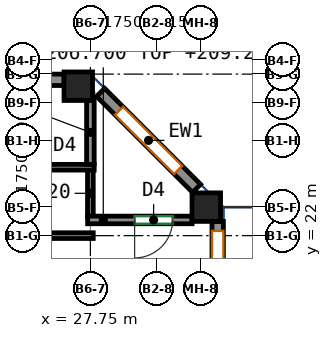
"""IFC4 building model, lengths in metres.
Left out: names, types, materials, properties, quantities, classifications, styles, units other than length and angle.
Written with IfcOpenShell. Run it as: python <this file> out.ifc"""

import sys

from ifc_helpers import new_model, si_unit, direction, frame, frame_2d, origin, origin_2d, place, context, subcontext, project, spatial, rectangle, extrude, source, transform, mapped, element, fill, save


model = new_model("IFC4")
c1 = context("Model", 3, precision=1e-05, world=origin(), true_north=direction((0.0, 1.0)))
c2 = subcontext(c1, "Body", "Model", "MODEL_VIEW")
j1 = project(units=[si_unit("LENGTHUNIT", "METRE"), si_unit("PLANEANGLEUNIT", "RADIAN")], contexts=[c1])
p1 = place(None, origin())
s1 = spatial("IfcSite", under=j1, at=p1, CompositionType="ELEMENT")
p2 = place(p1, origin())
s2 = spatial("IfcBuilding", under=s1, at=p2, CompositionType="ELEMENT")
p3 = place(p2, frame((0.0, 0.0, 206.7)))
s3 = spatial("IfcBuildingStorey", under=s2, at=p3, CompositionType="ELEMENT", Elevation=206.7)
m1 = source(origin(), c2, "Body", "SweptSolid", [
    extrude(rectangle(XDim=0.75, YDim=0.75, at=origin_2d()), origin(), (0.0, 0.0, 1.0), 3.12),
])
for number, where, z_axis, x_axis in (
    (1, (27.432, 25.932, 0.0), (0.0, 0.0, 1.0), (1.0, 0.0, 0.0)),
    (2, (30.8, 22.75, 0.0), (0.0, 0.0, 1.0), (1.0, 0.0, 0.0)),
):
    element("IfcColumn", number, at=place(p3, frame(where, z_axis=z_axis, x_axis=x_axis)), inside=s3, PredefinedType="COLUMN", context=c2, shape_type="MappedRepresentation", body=[
        mapped(m1, transform((0.0, 0.0, 0.0))),
    ])
m2 = source(origin(), c2, "Body", "SweptSolid", [
    extrude(rectangle(XDim=14.0, YDim=0.3, at=frame_2d((7.0, 0.0))), origin(), (0.0, 0.0, 1.0), 3.12),
])
p4 = place(p3, frame((31.1, 8.375, 0.0), z_axis=(0.0, 0.0, 1.0), x_axis=(0.0, 1.0, 0.0)))
e3 = element("IfcWall", 3, at=p4, inside=s3, PredefinedType="SOLIDWALL", context=c2, shape_type="MappedRepresentation", body=[
    mapped(m2, transform((0.0, 0.0, 0.0))),
])
p5 = place(p4, frame((1.75, 0.0, 0.85)))
e4 = element("IfcOpeningElement", 4, at=p5, cuts=e3, PredefinedType="OPENING", context=c2, shape_type="SweptSolid", body=[
    extrude(rectangle(XDim=1.5, YDim=1.95, at=frame_2d((0.75, 0.975))), frame((0.0, 0.16, 0.0), z_axis=(0.0, -1.0, 0.0), x_axis=(1.0, 0.0, 0.0)), (0.0, 0.0, 1.0), 0.32),
])
p6 = place(p4, frame((5.25, 0.0, 0.85)))
e5 = element("IfcOpeningElement", 5, at=p6, cuts=e3, PredefinedType="OPENING", context=c2, shape_type="SweptSolid", body=[
    extrude(rectangle(XDim=1.5, YDim=1.95, at=frame_2d((0.75, 0.975))), frame((0.0, 0.16, 0.0), z_axis=(0.0, -1.0, 0.0), x_axis=(1.0, 0.0, 0.0)), (0.0, 0.0, 1.0), 0.32),
])
p7 = place(p4, frame((8.75, 0.0, 0.85)))
e6 = element("IfcOpeningElement", 6, at=p7, cuts=e3, PredefinedType="OPENING", context=c2, shape_type="SweptSolid", body=[
    extrude(rectangle(XDim=1.5, YDim=1.95, at=frame_2d((0.75, 0.975))), frame((0.0, 0.16, 0.0), z_axis=(0.0, -1.0, 0.0), x_axis=(1.0, 0.0, 0.0)), (0.0, 0.0, 1.0), 0.32),
])
p8 = place(p4, frame((12.25, 0.0, 0.85)))
e7 = element("IfcOpeningElement", 7, at=p8, cuts=e3, PredefinedType="OPENING", context=c2, shape_type="SweptSolid", body=[
    extrude(rectangle(XDim=1.5, YDim=1.95, at=frame_2d((0.75, 0.975))), frame((0.0, 0.16, 0.0), z_axis=(0.0, -1.0, 0.0), x_axis=(1.0, 0.0, 0.0)), (0.0, 0.0, 1.0), 0.32),
])
p9 = place(p4, frame((10.95, 0.0, 0.0)))
e8 = element("IfcOpeningElement", 8, at=p9, cuts=e3, PredefinedType="OPENING", context=c2, shape_type="SweptSolid", body=[
    extrude(rectangle(XDim=1.0, YDim=2.1, at=frame_2d((0.5, 1.05))), frame((0.0, 0.16, 0.0), z_axis=(0.0, -1.0, 0.0), x_axis=(1.0, 0.0, 0.0)), (0.0, 0.0, 1.0), 0.32),
])
m3 = source(origin(), c2, "Body", "SweptSolid", [
    extrude(rectangle(XDim=3.571, YDim=0.3, at=frame_2d((1.786, 0.0))), origin(), (0.0, 0.0, 1.0), 3.12),
])
p10 = place(p3, frame((30.544, 23.244, 0.0), z_axis=(0.0, 0.0, 1.0), x_axis=(-0.707140964879, 0.707072595841, 0.0)))
e9 = element("IfcWall", 9, at=p10, inside=s3, PredefinedType="SOLIDWALL", context=c2, shape_type="MappedRepresentation", body=[
    mapped(m3, transform((0.0, 0.0, 0.0))),
])
p11 = place(p10, frame((0.686, 0.0, 0.85)))
e10 = element("IfcOpeningElement", 10, at=p11, cuts=e9, PredefinedType="OPENING", context=c2, shape_type="SweptSolid", body=[
    extrude(rectangle(XDim=2.2, YDim=1.95, at=frame_2d((1.1, 0.975))), frame((0.0, 0.16, 0.0), z_axis=(0.0, -1.0, 0.0), x_axis=(1.0, 0.0, 0.0)), (0.0, 0.0, 1.0), 0.32),
])
m4 = source(origin(), c2, "Body", "SweptSolid", [
    extrude(rectangle(XDim=6.515, YDim=0.3, at=frame_2d((3.258, 0.0))), origin(), (0.0, 0.0, 1.0), 3.12),
])
p12 = place(p3, frame((27.057, 26.1, 0.0), z_axis=(0.0, 0.0, 1.0), x_axis=(-1.0, 0.0, 0.0)))
e11 = element("IfcWall", 11, at=p12, inside=s3, PredefinedType="SOLIDWALL", context=c2, shape_type="MappedRepresentation", body=[
    mapped(m4, transform((0.0, 0.0, 0.0))),
])
p13 = place(p12, frame((0.529, 0.0, 0.85)))
e12 = element("IfcOpeningElement", 12, at=p13, cuts=e11, PredefinedType="OPENING", context=c2, shape_type="SweptSolid", body=[
    extrude(rectangle(XDim=2.2, YDim=1.95, at=frame_2d((1.1, 0.975))), frame((0.0, 0.16, 0.0), z_axis=(0.0, -1.0, 0.0), x_axis=(1.0, 0.0, 0.0)), (0.0, 0.0, 1.0), 0.32),
])
p14 = place(p12, frame((3.786, 0.0, 0.85)))
e13 = element("IfcOpeningElement", 13, at=p14, cuts=e11, PredefinedType="OPENING", context=c2, shape_type="SweptSolid", body=[
    extrude(rectangle(XDim=2.2, YDim=1.95, at=frame_2d((1.1, 0.975))), frame((0.0, 0.16, 0.0), z_axis=(0.0, -1.0, 0.0), x_axis=(1.0, 0.0, 0.0)), (0.0, 0.0, 1.0), 0.32),
])
p15 = place(p3, frame((20.667, 22.0, 0.0), z_axis=(0.0, 0.0, 1.0), x_axis=(1.0, 0.0, 0.0)))
e14 = element("IfcWall", 14, at=p15, inside=s3, PredefinedType="PARTITIONING", context=c2, shape_type="SweptSolid", body=[
    extrude(rectangle(XDim=7.158, YDim=0.15, at=frame_2d((3.579, 0.0))), origin(), (0.0, 0.0, 1.0), 3.12),
])
p16 = place(p3, frame((27.75, 22.503, 0.0), z_axis=(0.0, 0.0, 1.0), x_axis=(0.0, 1.0, 0.0)))
e15 = element("IfcWall", 15, at=p16, inside=s3, PredefinedType="PARTITIONING", context=c2, shape_type="SweptSolid", body=[
    extrude(rectangle(XDim=1.222, YDim=0.15, at=frame_2d((0.611, 0.0))), origin(), (0.0, 0.0, 1.0), 2.52),
])
p17 = place(p3, frame((-17.85, 23.8, 0.0), z_axis=(0.0, 0.0, 1.0), x_axis=(1.0, 0.0, 0.0)))
e16 = element("IfcWall", 16, at=p17, inside=s3, PredefinedType="PARTITIONING", context=c2, shape_type="SweptSolid", body=[
    extrude(rectangle(XDim=45.7, YDim=0.15, at=frame_2d((22.85, 0.0))), origin(), (0.0, 0.0, 1.0), 3.12),
])
p18 = place(p17, frame((0.6, 0.0, 0.0)))
e17 = element("IfcOpeningElement", 17, at=p18, cuts=e16, PredefinedType="OPENING", context=c2, shape_type="SweptSolid", body=[
    extrude(rectangle(XDim=0.9, YDim=2.1, at=frame_2d((0.45, 1.05))), frame((0.0, 0.085, 0.0), z_axis=(0.0, -1.0, 0.0), x_axis=(1.0, 0.0, 0.0)), (0.0, 0.0, 1.0), 0.17),
])
p19 = place(p17, frame((4.081, 0.0, 0.0)))
e18 = element("IfcOpeningElement", 18, at=p19, cuts=e16, PredefinedType="OPENING", context=c2, shape_type="SweptSolid", body=[
    extrude(rectangle(XDim=1.0, YDim=2.1, at=frame_2d((0.5, 1.05))), frame((0.0, 0.085, 0.0), z_axis=(0.0, -1.0, 0.0), x_axis=(1.0, 0.0, 0.0)), (0.0, 0.0, 1.0), 0.17),
])
p20 = place(p17, frame((9.481, 0.0, 0.0)))
e19 = element("IfcOpeningElement", 19, at=p20, cuts=e16, PredefinedType="OPENING", context=c2, shape_type="SweptSolid", body=[
    extrude(rectangle(XDim=0.9, YDim=2.1, at=frame_2d((0.45, 1.05))), frame((0.0, 0.085, 0.0), z_axis=(0.0, -1.0, 0.0), x_axis=(1.0, 0.0, 0.0)), (0.0, 0.0, 1.0), 0.17),
])
p21 = place(p17, frame((12.803, 0.0, 0.0)))
e20 = element("IfcOpeningElement", 20, at=p21, cuts=e16, PredefinedType="OPENING", context=c2, shape_type="SweptSolid", body=[
    extrude(rectangle(XDim=1.0, YDim=2.1, at=frame_2d((0.5, 1.05))), frame((0.0, 0.085, 0.0), z_axis=(0.0, -1.0, 0.0), x_axis=(1.0, 0.0, 0.0)), (0.0, 0.0, 1.0), 0.17),
])
p22 = place(p17, frame((15.489, 0.0, 0.0)))
e21 = element("IfcOpeningElement", 21, at=p22, cuts=e16, PredefinedType="OPENING", context=c2, shape_type="SweptSolid", body=[
    extrude(rectangle(XDim=0.9, YDim=2.1, at=frame_2d((0.45, 1.05))), frame((0.0, 0.085, 0.0), z_axis=(0.0, -1.0, 0.0), x_axis=(1.0, 0.0, 0.0)), (0.0, 0.0, 1.0), 0.17),
])
p23 = place(p17, frame((21.244, 0.0, 0.0)))
e22 = element("IfcOpeningElement", 22, at=p23, cuts=e16, PredefinedType="OPENING", context=c2, shape_type="SweptSolid", body=[
    extrude(rectangle(XDim=0.9, YDim=2.1, at=frame_2d((0.45, 1.05))), frame((0.0, 0.085, 0.0), z_axis=(0.0, -1.0, 0.0), x_axis=(1.0, 0.0, 0.0)), (0.0, 0.0, 1.0), 0.17),
])
p24 = place(p17, frame((23.542, 0.0, 0.0)))
e23 = element("IfcOpeningElement", 23, at=p24, cuts=e16, PredefinedType="OPENING", context=c2, shape_type="SweptSolid", body=[
    extrude(rectangle(XDim=1.0, YDim=2.1, at=frame_2d((0.5, 1.05))), frame((0.0, 0.085, 0.0), z_axis=(0.0, -1.0, 0.0), x_axis=(1.0, 0.0, 0.0)), (0.0, 0.0, 1.0), 0.17),
])
p25 = place(p17, frame((28.841, 0.0, 0.0)))
e24 = element("IfcOpeningElement", 24, at=p25, cuts=e16, PredefinedType="OPENING", context=c2, shape_type="SweptSolid", body=[
    extrude(rectangle(XDim=0.9, YDim=2.1, at=frame_2d((0.45, 1.05))), frame((0.0, 0.085, 0.0), z_axis=(0.0, -1.0, 0.0), x_axis=(1.0, 0.0, 0.0)), (0.0, 0.0, 1.0), 0.17),
])
p26 = place(p17, frame((32.331, 0.0, 0.0)))
e25 = element("IfcOpeningElement", 25, at=p26, cuts=e16, PredefinedType="OPENING", context=c2, shape_type="SweptSolid", body=[
    extrude(rectangle(XDim=1.0, YDim=2.1, at=frame_2d((0.5, 1.05))), frame((0.0, 0.085, 0.0), z_axis=(0.0, -1.0, 0.0), x_axis=(1.0, 0.0, 0.0)), (0.0, 0.0, 1.0), 0.17),
])
p27 = place(p17, frame((35.42, 0.0, 0.0)))
e26 = element("IfcOpeningElement", 26, at=p27, cuts=e16, PredefinedType="OPENING", context=c2, shape_type="SweptSolid", body=[
    extrude(rectangle(XDim=0.9, YDim=2.1, at=frame_2d((0.45, 1.05))), frame((0.0, 0.085, 0.0), z_axis=(0.0, -1.0, 0.0), x_axis=(1.0, 0.0, 0.0)), (0.0, 0.0, 1.0), 0.17),
])
p28 = place(p17, frame((40.317, 0.0, 0.0)))
e27 = element("IfcOpeningElement", 27, at=p28, cuts=e16, PredefinedType="OPENING", context=c2, shape_type="SweptSolid", body=[
    extrude(rectangle(XDim=0.9, YDim=2.1, at=frame_2d((0.45, 1.05))), frame((0.0, 0.085, 0.0), z_axis=(0.0, -1.0, 0.0), x_axis=(1.0, 0.0, 0.0)), (0.0, 0.0, 1.0), 0.17),
])
p29 = place(p17, frame((43.199, 0.0, 0.0)))
e28 = element("IfcOpeningElement", 28, at=p29, cuts=e16, PredefinedType="OPENING", context=c2, shape_type="SweptSolid", body=[
    extrude(rectangle(XDim=1.0, YDim=2.1, at=frame_2d((0.5, 1.05))), frame((0.0, 0.085, 0.0), z_axis=(0.0, -1.0, 0.0), x_axis=(1.0, 0.0, 0.0)), (0.0, 0.0, 1.0), 0.17),
])
p30 = place(p3, frame((30.425, 22.413, 0.0), z_axis=(0.0, 0.0, 1.0), x_axis=(-1.0, 0.0, 0.0)))
e29 = element("IfcWall", 29, at=p30, inside=s3, PredefinedType="PARTITIONING", context=c2, shape_type="SweptSolid", body=[
    extrude(rectangle(XDim=2.748, YDim=0.2, at=frame_2d((1.374, 0.0))), origin(), (0.0, 0.0, 1.0), 2.52),
])
p31 = place(p30, frame((0.511, 0.0, 0.0)))
e30 = element("IfcOpeningElement", 30, at=p31, cuts=e29, PredefinedType="OPENING", context=c2, shape_type="SweptSolid", body=[
    extrude(rectangle(XDim=1.0, YDim=2.1, at=frame_2d((0.5, 1.05))), frame((0.0, 0.11, 0.0), z_axis=(0.0, -1.0, 0.0), x_axis=(1.0, 0.0, 0.0)), (0.0, 0.0, 1.0), 0.22),
])
p32 = place(p3, frame((27.75, 25.557, 0.0), z_axis=(0.0, 0.0, 1.0), x_axis=(0.0, -1.0, 0.0)))
e31 = element("IfcWall", 31, at=p32, inside=s3, PredefinedType="PARTITIONING", context=c2, shape_type="SweptSolid", body=[
    extrude(rectangle(XDim=1.68, YDim=0.2, at=frame_2d((0.84, 0.0))), origin(), (0.0, 0.0, 1.0), 2.52),
])
p33 = place(p8, origin())
e32 = element("IfcWindow", 32, at=p33, inside=s3, PartitioningType="SINGLE_PANEL", PredefinedType="WINDOW", context=c2, shape_type="SweptSolid", body=[
    extrude(rectangle(XDim=1.5, YDim=1.95, at=frame_2d((0.75, 0.975))), frame((0.0, 0.03, 0.0), z_axis=(0.0, -1.0, 0.0), x_axis=(1.0, 0.0, 0.0)), (0.0, 0.0, 1.0), 0.06),
])
fill(e7, e32)
p34 = place(p11, origin())
e33 = element("IfcWindow", 33, at=p34, inside=s3, PartitioningType="SINGLE_PANEL", PredefinedType="WINDOW", context=c2, shape_type="SweptSolid", body=[
    extrude(rectangle(XDim=2.2, YDim=1.95, at=frame_2d((1.1, 0.975))), frame((0.0, 0.03, 0.0), z_axis=(0.0, -1.0, 0.0), x_axis=(1.0, 0.0, 0.0)), (0.0, 0.0, 1.0), 0.06),
])
fill(e10, e33)
p35 = place(p31, origin())
e34 = element("IfcDoor", 34, at=p35, inside=s3, OperationType="SINGLE_SWING_RIGHT", PredefinedType="DOOR", context=c2, shape_type="SweptSolid", body=[
    extrude(rectangle(XDim=1.0, YDim=2.1, at=frame_2d((0.5, 1.05))), frame((0.0, 0.025, 0.0), z_axis=(0.0, -1.0, 0.0), x_axis=(1.0, 0.0, 0.0)), (0.0, 0.0, 1.0), 0.05),
])
fill(e30, e34)
save(model, sys.argv[1])
